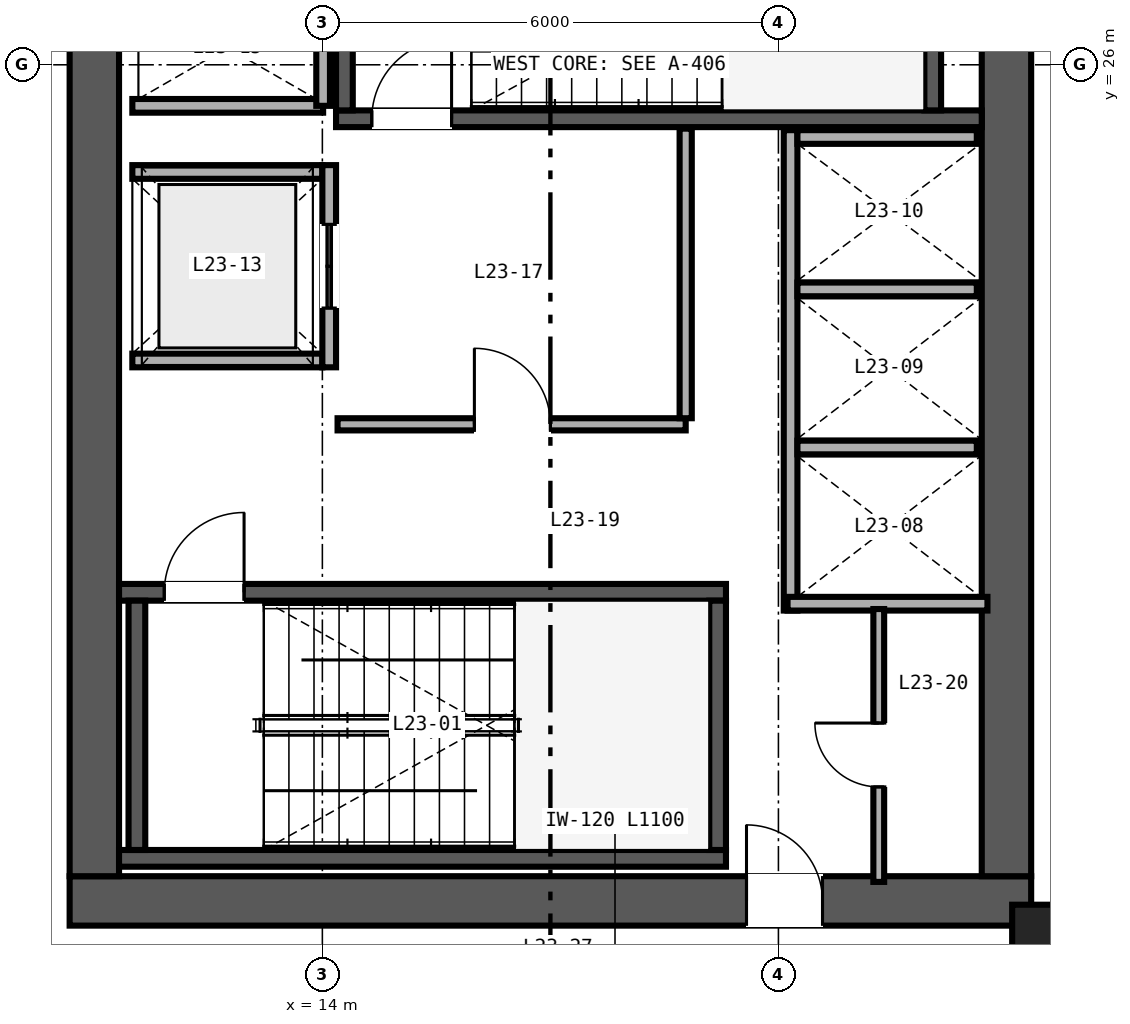
"""IFC4 building model, lengths in metres.
Left out: names, types, materials, properties, quantities, classifications, styles, units other than length and angle.
Written with IfcOpenShell. Run it as: python <this file> out.ifc"""

import sys

from ifc_helpers import new_model, si_unit, direction, frame, frame_2d, origin, origin_2d, place, context, subcontext, project, spatial, rectangle, hollow_rectangle, extrude, source, transform, mapped, element, fill, save


model = new_model("IFC4")
c1 = context("Model", 3, precision=1e-05, world=origin(), true_north=direction((0.0, 1.0)))
c2 = subcontext(c1, "Body", "Model", "MODEL_VIEW")
j1 = project(units=[si_unit("LENGTHUNIT", "METRE"), si_unit("PLANEANGLEUNIT", "RADIAN")], contexts=[c1])
p1 = place(None, origin())
s1 = spatial("IfcSite", under=j1, at=p1, CompositionType="ELEMENT")
p2 = place(p1, origin())
s2 = spatial("IfcBuilding", under=s1, at=p2, CompositionType="ELEMENT")
p3 = place(p2, frame((0.0, 0.0, 97.2)))
s3 = spatial("IfcBuildingStorey", under=s2, at=p3, CompositionType="ELEMENT", Elevation=97.2)
p4 = place(p3, frame((10.675, 15.0, 0.0), z_axis=(0.0, 0.0, 1.0), x_axis=(1.0, 0.0, 0.0)))
e1 = element("IfcWall", 1, at=p4, inside=s3, PredefinedType="SHEAR", context=c2, shape_type="SweptSolid", body=[
    extrude(rectangle(XDim=12.65, YDim=0.65, at=frame_2d((6.325, 0.0))), origin(), (0.0, 0.0, 1.0), 3.36),
])
p5 = place(p4, frame((8.905, 0.0, 0.0)))
e2 = element("IfcOpeningElement", 2, at=p5, cuts=e1, PredefinedType="OPENING", context=c2, shape_type="SweptSolid", body=[
    extrude(rectangle(XDim=1.0, YDim=2.15, at=frame_2d((0.5, 1.075))), frame((0.0, 0.335, 0.0), z_axis=(0.0, -1.0, 0.0), x_axis=(1.0, 0.0, 0.0)), (0.0, 0.0, 1.0), 0.67),
])
for number, where, z_axis, x_axis in (
    (3, (11.0, 15.325, 0.0), (0.0, 0.0, 1.0), (0.0, 1.0, 0.0)),
    (4, (23.0, 15.325, 0.0), (0.0, 0.0, 1.0), (0.0, 1.0, 0.0)),
):
    element("IfcWall", number, at=place(p3, frame(where, z_axis=z_axis, x_axis=x_axis)), inside=s3, PredefinedType="SHEAR", context=c2, shape_type="SweptSolid", body=[
        extrude(rectangle(XDim=21.35, YDim=0.65, at=frame_2d((10.675, 0.0))), origin(), (0.0, 0.0, 1.0), 3.36),
    ])
p6 = place(p3, frame((11.325, 15.56, 0.0), z_axis=(0.0, 0.0, 1.0), x_axis=(1.0, 0.0, 0.0)))
e5 = element("IfcWall", 5, at=p6, inside=s3, PredefinedType="SHEAR", context=c2, shape_type="SweptSolid", body=[
    extrude(rectangle(XDim=7.985, YDim=0.22, at=frame_2d((3.993, 0.0))), origin(), (0.0, 0.0, 1.0), 3.4),
])
p7 = place(p3, frame((11.325, 19.06, 0.0), z_axis=(0.0, 0.0, 1.0), x_axis=(1.0, 0.0, 0.0)))
e6 = element("IfcWall", 6, at=p7, inside=s3, PredefinedType="SHEAR", context=c2, shape_type="SweptSolid", body=[
    extrude(rectangle(XDim=7.985, YDim=0.22, at=frame_2d((3.993, 0.0))), origin(), (0.0, 0.0, 1.0), 3.4),
])
p8 = place(p7, frame((0.595, 0.0, 0.0)))
e7 = element("IfcOpeningElement", 7, at=p8, cuts=e6, PredefinedType="OPENING", context=c2, shape_type="SweptSolid", body=[
    extrude(rectangle(XDim=1.05, YDim=2.15, at=frame_2d((0.525, 1.075))), frame((0.0, 0.12, 0.0), z_axis=(0.0, -1.0, 0.0), x_axis=(1.0, 0.0, 0.0)), (0.0, 0.0, 1.0), 0.24),
])
for number, where, z_axis, x_axis in (
    (8, (11.56, 15.67, 0.0), (0.0, 0.0, 1.0), (0.0, 1.0, 0.0)),
    (9, (19.2, 15.67, 0.0), (0.0, 0.0, 1.0), (0.0, 1.0, 0.0)),
):
    element("IfcWall", number, at=place(p3, frame(where, z_axis=z_axis, x_axis=x_axis)), inside=s3, PredefinedType="SHEAR", context=c2, shape_type="SweptSolid", body=[
        extrude(rectangle(XDim=3.28, YDim=0.22, at=frame_2d((1.64, 0.0))), origin(), (0.0, 0.0, 1.0), 3.4),
    ])
p9 = place(p3, frame((14.18, 25.29, 0.0), z_axis=(0.0, 0.0, 1.0), x_axis=(1.0, 0.0, 0.0)))
e10 = element("IfcWall", 10, at=p9, inside=s3, PredefinedType="SHEAR", context=c2, shape_type="SweptSolid", body=[
    extrude(rectangle(XDim=8.495, YDim=0.22, at=frame_2d((4.248, 0.0))), origin(), (0.0, 0.0, 1.0), 3.4),
])
p10 = place(p9, frame((0.47, 0.0, 0.0)))
e11 = element("IfcOpeningElement", 11, at=p10, cuts=e10, PredefinedType="OPENING", context=c2, shape_type="SweptSolid", body=[
    extrude(rectangle(XDim=1.05, YDim=2.15, at=frame_2d((0.525, 1.075))), frame((0.0, 0.12, 0.0), z_axis=(0.0, -1.0, 0.0), x_axis=(1.0, 0.0, 0.0)), (0.0, 0.0, 1.0), 0.24),
])
for number, where, z_axis, x_axis in (
    (12, (14.29, 25.4, 0.0), (0.0, 0.0, 1.0), (0.0, 1.0, 0.0)),
    (13, (22.03, 25.4, 0.0), (0.0, 0.0, 1.0), (0.0, 1.0, 0.0)),
):
    element("IfcWall", number, at=place(p3, frame(where, z_axis=z_axis, x_axis=x_axis)), inside=s3, PredefinedType="SHEAR", context=c2, shape_type="SweptSolid", body=[
        extrude(rectangle(XDim=3.28, YDim=0.22, at=frame_2d((1.64, 0.0))), origin(), (0.0, 0.0, 1.0), 3.4),
    ])
m1 = source(origin(), c2, "Body", "SweptSolid", [
    extrude(hollow_rectangle(XDim=0.85, YDim=0.8, WallThickness=0.032, at=origin_2d()), origin(), (0.0, 0.0, 1.0), 3.36),
])
p11 = place(p3, frame((23.5, 14.55, 0.0), z_axis=(0.0, 0.0, 1.0), x_axis=(1.0, 0.0, 0.0)))
e14 = element("IfcColumn", 14, at=p11, inside=s3, PredefinedType="COLUMN", context=c2, shape_type="MappedRepresentation", body=[
    mapped(m1, transform((0.0, 0.0, 0.0), scale=1.0)),
])
p12 = place(p3, frame((20.16, 18.82, 0.0), z_axis=(0.0, 0.0, 1.0), x_axis=(0.0, 1.0, 0.0)))
e15 = element("IfcWall", 15, at=p12, inside=s3, PredefinedType="SOLIDWALL", context=c2, shape_type="SweptSolid", body=[
    extrude(rectangle(XDim=6.32, YDim=0.18, at=frame_2d((3.16, 0.0))), origin(), (0.0, 0.0, 1.0), 2.36),
])
p13 = place(p3, frame((20.12, 18.91, 0.0), z_axis=(0.0, 0.0, 1.0), x_axis=(1.0, 0.0, 0.0)))
e16 = element("IfcWall", 16, at=p13, inside=s3, PredefinedType="SOLIDWALL", context=c2, shape_type="SweptSolid", body=[
    extrude(rectangle(XDim=2.63, YDim=0.18, at=frame_2d((1.315, 0.0))), origin(), (0.0, 0.0, 1.0), 3.36),
])
p14 = place(p3, frame((20.25, 25.05, 0.0), z_axis=(0.0, 0.0, 1.0), x_axis=(1.0, 0.0, 0.0)))
e17 = element("IfcWall", 17, at=p14, inside=s3, PredefinedType="SOLIDWALL", context=c2, shape_type="SweptSolid", body=[
    extrude(rectangle(XDim=2.36, YDim=0.18, at=frame_2d((1.18, 0.0))), origin(), (0.0, 0.0, 1.0), 3.36),
])
p15 = place(p3, frame((20.25, 20.965, 0.0), z_axis=(0.0, 0.0, 1.0), x_axis=(1.0, 0.0, 0.0)))
e18 = element("IfcWall", 18, at=p15, inside=s3, PredefinedType="SOLIDWALL", context=c2, shape_type="SweptSolid", body=[
    extrude(rectangle(XDim=2.36, YDim=0.18, at=frame_2d((1.18, 0.0))), origin(), (0.0, 0.0, 1.0), 2.36),
])
p16 = place(p3, frame((20.25, 23.045, 0.0), z_axis=(0.0, 0.0, 1.0), x_axis=(1.0, 0.0, 0.0)))
e19 = element("IfcWall", 19, at=p16, inside=s3, PredefinedType="SOLIDWALL", context=c2, shape_type="SweptSolid", body=[
    extrude(rectangle(XDim=2.36, YDim=0.18, at=frame_2d((1.18, 0.0))), origin(), (0.0, 0.0, 1.0), 3.36),
])
for number, where, z_axis, x_axis in (
    (20, (11.5, 22.11, 0.0), (0.0, 0.0, 1.0), (1.0, 0.0, 0.0)),
    (21, (11.5, 24.59, 0.0), (0.0, 0.0, 1.0), (1.0, 0.0, 0.0)),
):
    element("IfcWall", number, at=place(p3, frame(where, z_axis=z_axis, x_axis=x_axis)), inside=s3, PredefinedType="SOLIDWALL", context=c2, shape_type="SweptSolid", body=[
        extrude(rectangle(XDim=2.5, YDim=0.18, at=frame_2d((1.25, 0.0))), origin(), (0.0, 0.0, 1.0), 3.36),
    ])
p17 = place(p3, frame((14.09, 22.02, 0.0), z_axis=(0.0, 0.0, 1.0), x_axis=(0.0, 1.0, 0.0)))
e22 = element("IfcWall", 22, at=p17, inside=s3, PredefinedType="SOLIDWALL", context=c2, shape_type="SweptSolid", body=[
    extrude(rectangle(XDim=2.66, YDim=0.18, at=frame_2d((1.33, 0.0))), origin(), (0.0, 0.0, 1.0), 3.36),
])
p18 = place(p17, frame((0.78, 0.0, 0.0)))
e23 = element("IfcOpeningElement", 23, at=p18, cuts=e22, PredefinedType="OPENING", context=c2, shape_type="SweptSolid", body=[
    extrude(rectangle(XDim=1.1, YDim=2.2, at=frame_2d((0.55, 1.1))), frame((0.0, 0.1, 0.0), z_axis=(0.0, -1.0, 0.0), x_axis=(1.0, 0.0, 0.0)), (0.0, 0.0, 1.0), 0.2),
])
p19 = place(p3, frame((11.5, 25.46, 0.0), z_axis=(0.0, 0.0, 1.0), x_axis=(1.0, 0.0, 0.0)))
e24 = element("IfcWall", 24, at=p19, inside=s3, PredefinedType="SOLIDWALL", context=c2, shape_type="SweptSolid", body=[
    extrude(rectangle(XDim=2.51, YDim=0.18, at=frame_2d((1.255, 0.0))), origin(), (0.0, 0.0, 1.0), 3.36),
])
p20 = place(p3, frame((14.01, 25.46, 0.0), z_axis=(0.0, 0.0, 1.0), x_axis=(0.0, 1.0, 0.0)))
e25 = element("IfcWall", 25, at=p20, inside=s3, PredefinedType="SOLIDWALL", context=c2, shape_type="SweptSolid", body=[
    extrude(rectangle(XDim=3.08, YDim=0.18, at=frame_2d((1.54, 0.0))), origin(), (0.0, 0.0, 1.0), 3.36),
])
p21 = place(p3, frame((14.2, 21.27, 0.0), z_axis=(0.0, 0.0, 1.0), x_axis=(1.0, 0.0, 0.0)))
e26 = element("IfcWall", 26, at=p21, inside=s3, PredefinedType="PARTITIONING", context=c2, shape_type="SweptSolid", body=[
    extrude(rectangle(XDim=4.58, YDim=0.16, at=frame_2d((2.29, 0.0))), origin(), (0.0, 0.0, 1.0), 3.36),
])
p22 = place(p21, frame((1.8, 0.0, 0.0)))
e27 = element("IfcOpeningElement", 27, at=p22, cuts=e26, PredefinedType="OPENING", context=c2, shape_type="SweptSolid", body=[
    extrude(rectangle(XDim=1.0, YDim=2.15, at=frame_2d((0.5, 1.075))), frame((0.0, 0.09, 0.0), z_axis=(0.0, -1.0, 0.0), x_axis=(1.0, 0.0, 0.0)), (0.0, 0.0, 1.0), 0.18),
])
p23 = place(p3, frame((18.78, 21.35, 0.0), z_axis=(0.0, 0.0, 1.0), x_axis=(0.0, 1.0, 0.0)))
e28 = element("IfcWall", 28, at=p23, inside=s3, PredefinedType="PARTITIONING", context=c2, shape_type="SweptSolid", body=[
    extrude(rectangle(XDim=3.81, YDim=0.16, at=frame_2d((1.905, 0.0))), origin(), (0.0, 0.0, 1.0), 3.36),
])
p24 = place(p3, frame((21.32, 15.25, 0.0), z_axis=(0.0, 0.0, 1.0), x_axis=(0.0, 1.0, 0.0)))
e29 = element("IfcWall", 29, at=p24, inside=s3, PredefinedType="PARTITIONING", context=c2, shape_type="SweptSolid", body=[
    extrude(rectangle(XDim=3.59, YDim=0.142, at=frame_2d((1.795, 0.0))), origin(), (0.0, 0.0, 1.0), 3.36),
])
p25 = place(p24, frame((1.25, 0.0, 0.0)))
e30 = element("IfcOpeningElement", 30, at=p25, cuts=e29, PredefinedType="OPENING", context=c2, shape_type="SweptSolid", body=[
    extrude(rectangle(XDim=0.84, YDim=2.1, at=frame_2d((0.42, 1.05))), frame((0.0, 0.081, 0.0), z_axis=(0.0, -1.0, 0.0), x_axis=(1.0, 0.0, 0.0)), (0.0, 0.0, 1.0), 0.162),
])
m2 = source(origin(), c2, "Body", "SweptSolid", [
    extrude(rectangle(XDim=1.05, YDim=2.15, at=frame_2d((0.525, 1.075))), frame((0.0, 0.025, 0.0), z_axis=(0.0, -1.0, 0.0), x_axis=(1.0, 0.0, 0.0)), (0.0, 0.0, 1.0), 0.05),
])
p26 = place(p8, origin())
e31 = element("IfcDoor", 31, at=p26, inside=s3, OperationType="SINGLE_SWING_RIGHT", PredefinedType="DOOR", context=c2, shape_type="MappedRepresentation", body=[
    mapped(m2, transform((0.0, 0.0, 0.0), scale=1.0)),
])
fill(e7, e31)
p27 = place(p10, origin())
e32 = element("IfcDoor", 32, at=p27, inside=s3, OperationType="SINGLE_SWING_RIGHT", PredefinedType="DOOR", context=c2, shape_type="MappedRepresentation", body=[
    mapped(m2, transform((0.0, 0.0, 0.0), scale=1.0)),
])
fill(e11, e32)
m3 = source(origin(), c2, "Body", "SweptSolid", [
    extrude(rectangle(XDim=1.1, YDim=2.2, at=frame_2d((0.55, 1.1))), frame((0.0, 0.025, 0.0), z_axis=(0.0, -1.0, 0.0), x_axis=(1.0, 0.0, 0.0)), (0.0, 0.0, 1.0), 0.05),
])
p28 = place(p18, origin())
e33 = element("IfcDoor", 33, at=p28, inside=s3, OperationType="DOUBLE_DOOR_SLIDING", PredefinedType="DOOR", context=c2, shape_type="MappedRepresentation", body=[
    mapped(m3, transform((0.0, 0.0, 0.0), scale=1.0)),
])
fill(e23, e33)
m4 = source(origin(), c2, "Body", "SweptSolid", [
    extrude(rectangle(XDim=1.0, YDim=2.15, at=frame_2d((0.5, 1.075))), frame((0.0, 0.025, 0.0), z_axis=(0.0, -1.0, 0.0), x_axis=(1.0, 0.0, 0.0)), (0.0, 0.0, 1.0), 0.05),
])
p29 = place(p22, origin())
e34 = element("IfcDoor", 34, at=p29, inside=s3, OperationType="SINGLE_SWING_LEFT", PredefinedType="DOOR", context=c2, shape_type="MappedRepresentation", body=[
    mapped(m4, transform((0.0, 0.0, 0.0), scale=1.0)),
])
fill(e27, e34)
m5 = source(origin(), c2, "Body", "SweptSolid", [
    extrude(rectangle(XDim=0.84, YDim=2.1, at=frame_2d((0.42, 1.05))), frame((0.0, 0.025, 0.0), z_axis=(0.0, -1.0, 0.0), x_axis=(1.0, 0.0, 0.0)), (0.0, 0.0, 1.0), 0.05),
])
p30 = place(p25, origin())
e35 = element("IfcDoor", 35, at=p30, inside=s3, OperationType="SINGLE_SWING_RIGHT", PredefinedType="DOOR", context=c2, shape_type="MappedRepresentation", body=[
    mapped(m5, transform((0.0, 0.0, 0.0), scale=1.0)),
])
fill(e30, e35)
p31 = place(p5, origin())
e36 = element("IfcDoor", 36, at=p31, inside=s3, OperationType="SINGLE_SWING_LEFT", PredefinedType="DOOR", context=c2, shape_type="MappedRepresentation", body=[
    mapped(m4, transform((0.0, 0.0, 0.0), scale=1.0)),
])
fill(e2, e36)
save(model, sys.argv[1])
